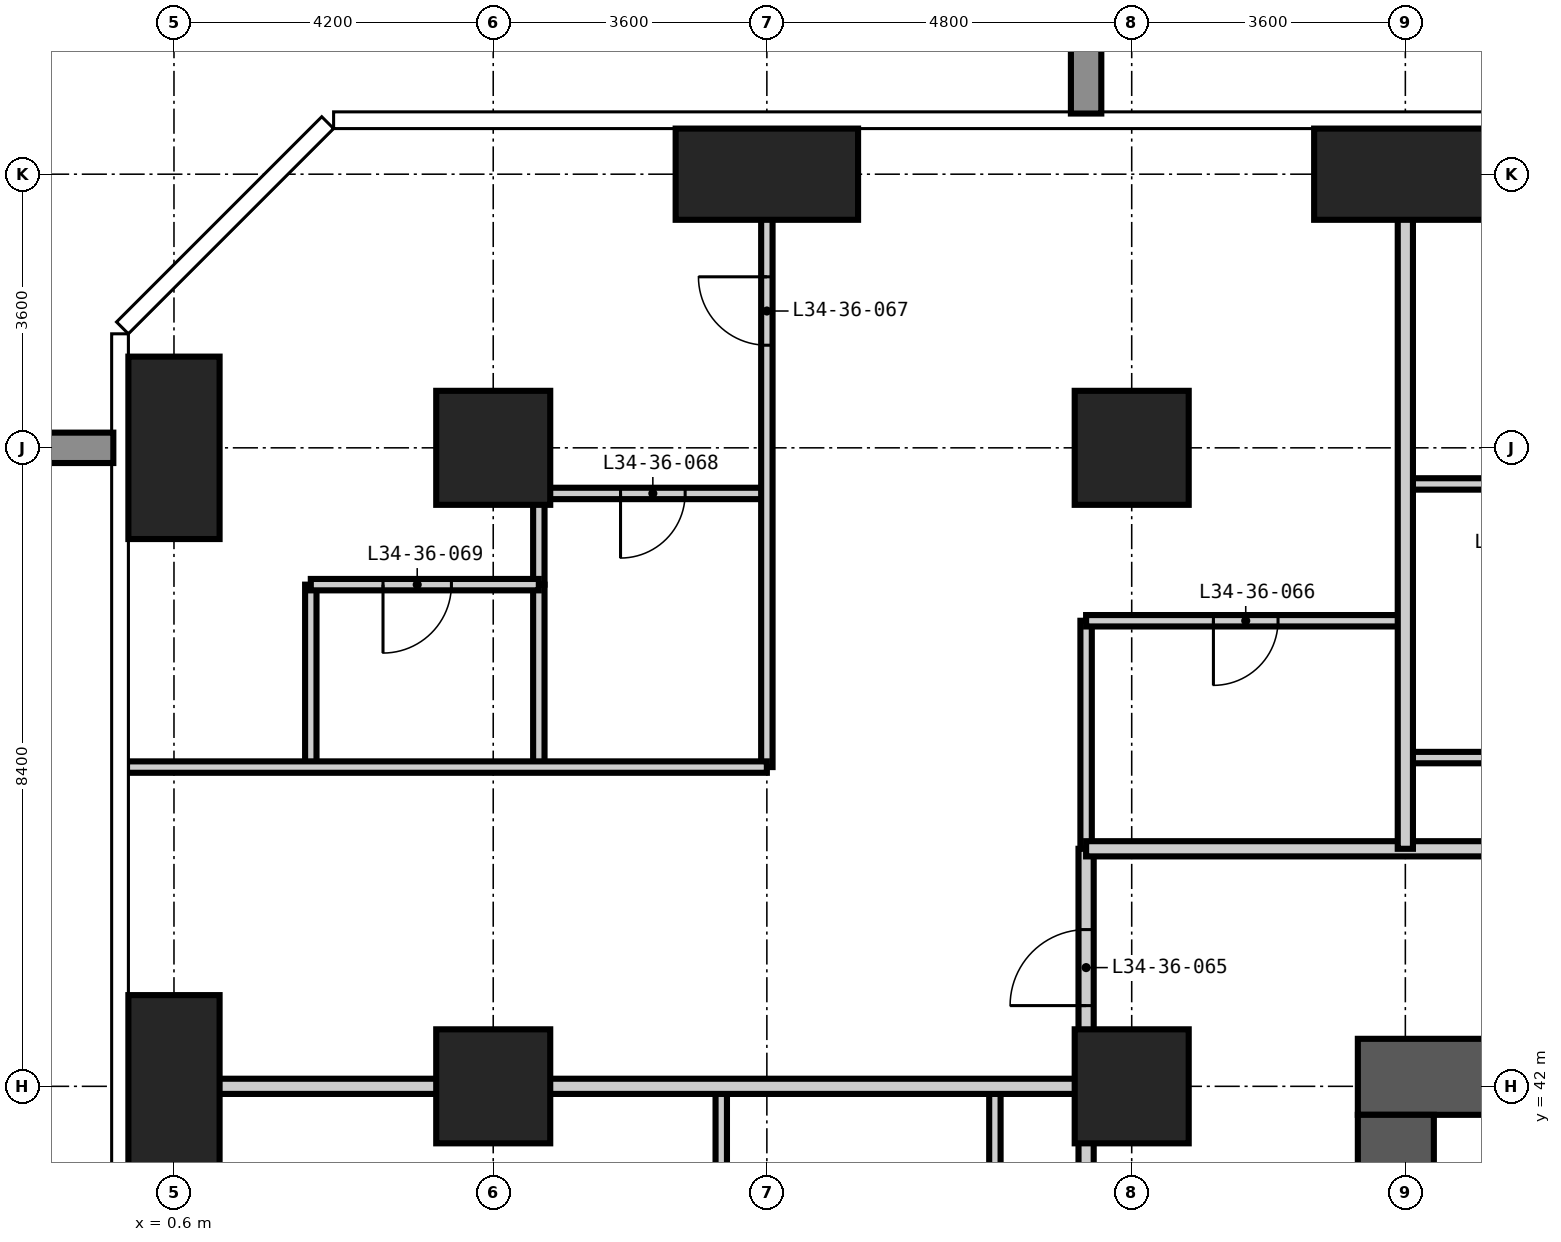
"""IFC4 building model, lengths in metres.
Left out: names, types, materials, properties, quantities, classifications, styles, units other than length and angle.
Written with IfcOpenShell. Run it as: python <this file> out.ifc"""

import sys

from ifc_helpers import new_model, si_unit, direction, frame, frame_2d, origin, origin_2d, place, context, subcontext, project, spatial, rectangle, extrude, element, fill, save


model = new_model("IFC4")
c1 = context("Model", 3, precision=1e-05, world=origin(), true_north=direction((0.0, 1.0)))
c2 = subcontext(c1, "Body", "Model", "MODEL_VIEW")
j1 = project(units=[si_unit("LENGTHUNIT", "METRE"), si_unit("PLANEANGLEUNIT", "RADIAN")], contexts=[c1])
p1 = place(None, origin())
s1 = spatial("IfcSite", under=j1, at=p1, CompositionType="ELEMENT")
p2 = place(p1, origin())
s2 = spatial("IfcBuilding", under=s1, at=p2, CompositionType="ELEMENT")
p3 = place(p2, frame((0.0, 0.0, 133.2)))
s3 = spatial("IfcBuildingStorey", under=s2, at=p3, CompositionType="ELEMENT", Elevation=133.2)
for number, where, z_axis, x_axis in (
    (1, (0.6, 42.0, -0.35), (0.0, 0.0, 1.0), (1.0, 0.0, 0.0)),
    (2, (0.6, 50.4, -0.35), (0.0, 0.0, 1.0), (1.0, 0.0, 0.0)),
):
    element("IfcColumn", number, at=place(p3, frame(where, z_axis=z_axis, x_axis=x_axis)), inside=s3, PredefinedType="COLUMN", context=c2, shape_type="SweptSolid", body=[
        extrude(rectangle(XDim=1.2, YDim=2.4, at=origin_2d()), origin(), (0.0, 0.0, 1.0), 3.6),
    ])
for number, where, z_axis, x_axis in (
    (3, (4.8, 42.0, -0.35), (0.0, 0.0, 1.0), (1.0, 0.0, 0.0)),
    (4, (4.8, 50.4, -0.35), (0.0, 0.0, 1.0), (1.0, 0.0, 0.0)),
):
    element("IfcColumn", number, at=place(p3, frame(where, z_axis=z_axis, x_axis=x_axis)), inside=s3, PredefinedType="COLUMN", context=c2, shape_type="SweptSolid", body=[
        extrude(rectangle(XDim=1.5, YDim=1.5, at=origin_2d()), origin(), (0.0, 0.0, 1.0), 3.6),
    ])
p4 = place(p3, frame((8.4, 54.0, -0.35), z_axis=(0.0, 0.0, 1.0), x_axis=(1.0, 0.0, 0.0)))
e5 = element("IfcColumn", 5, at=p4, inside=s3, PredefinedType="COLUMN", context=c2, shape_type="SweptSolid", body=[
    extrude(rectangle(XDim=2.4, YDim=1.2, at=origin_2d()), origin(), (0.0, 0.0, 1.0), 3.6),
])
for number, where, z_axis, x_axis in (
    (6, (13.2, 42.0, -0.35), (0.0, 0.0, 1.0), (1.0, 0.0, 0.0)),
    (7, (13.2, 50.4, -0.35), (0.0, 0.0, 1.0), (1.0, 0.0, 0.0)),
):
    element("IfcColumn", number, at=place(p3, frame(where, z_axis=z_axis, x_axis=x_axis)), inside=s3, PredefinedType="COLUMN", context=c2, shape_type="SweptSolid", body=[
        extrude(rectangle(XDim=1.5, YDim=1.5, at=origin_2d()), origin(), (0.0, 0.0, 1.0), 3.6),
    ])
p5 = place(p3, frame((16.8, 54.0, -0.35), z_axis=(0.0, 0.0, 1.0), x_axis=(1.0, 0.0, 0.0)))
e8 = element("IfcColumn", 8, at=p5, inside=s3, PredefinedType="COLUMN", context=c2, shape_type="SweptSolid", body=[
    extrude(rectangle(XDim=2.4, YDim=1.2, at=origin_2d()), origin(), (0.0, 0.0, 1.0), 3.6),
])
p6 = place(p3, frame((42.625, 42.125, -0.35), z_axis=(0.0, 0.0, 1.0), x_axis=(-1.0, 0.0, 0.0)))
e9 = element("IfcWall", 9, at=p6, inside=s3, PredefinedType="SHEAR", context=c2, shape_type="SweptSolid", body=[
    extrude(rectangle(XDim=26.45, YDim=1.0, at=frame_2d((13.225, 0.0))), origin(), (0.0, 0.0, 1.0), 3.6),
])
p7 = place(p6, frame((21.125, 0.0, 0.35)))
e10 = element("IfcOpeningElement", 10, at=p7, cuts=e9, PredefinedType="OPENING", context=c2, shape_type="SweptSolid", body=[
    extrude(rectangle(XDim=1.0, YDim=2.1, at=frame_2d((0.5, 1.05))), frame((0.0, 0.51, 0.0), z_axis=(0.0, -1.0, 0.0), x_axis=(1.0, 0.0, 0.0)), (0.0, 0.0, 1.0), 1.02),
])
p8 = place(p6, frame((10.525, 0.0, 0.35)))
e11 = element("IfcOpeningElement", 11, at=p8, cuts=e9, PredefinedType="OPENING", context=c2, shape_type="SweptSolid", body=[
    extrude(rectangle(XDim=1.2, YDim=2.2, at=frame_2d((0.6, 1.1))), frame((0.0, 0.51, 0.0), z_axis=(0.0, -1.0, 0.0), x_axis=(1.0, 0.0, 0.0)), (0.0, 0.0, 1.0), 1.02),
])
p9 = place(p3, frame((16.675, 41.625, -0.35), z_axis=(0.0, 0.0, 1.0), x_axis=(0.0, -1.0, 0.0)))
e12 = element("IfcWall", 12, at=p9, inside=s3, PredefinedType="SHEAR", context=c2, shape_type="SweptSolid", body=[
    extrude(rectangle(XDim=24.45, YDim=1.0, at=frame_2d((12.225, 0.0))), origin(), (0.0, 0.0, 1.0), 3.6),
])
p10 = place(p9, frame((11.325, 0.0, 0.35)))
e13 = element("IfcOpeningElement", 13, at=p10, cuts=e12, PredefinedType="OPENING", context=c2, shape_type="SweptSolid", body=[
    extrude(rectangle(XDim=1.8, YDim=2.2, at=frame_2d((0.9, 1.1))), frame((0.0, 0.51, 0.0), z_axis=(0.0, -1.0, 0.0), x_axis=(1.0, 0.0, 0.0)), (0.0, 0.0, 1.0), 1.02),
])
p11 = place(p9, frame((20.125, 0.0, 0.35)))
e14 = element("IfcOpeningElement", 14, at=p11, cuts=e12, PredefinedType="OPENING", context=c2, shape_type="SweptSolid", body=[
    extrude(rectangle(XDim=1.0, YDim=2.1, at=frame_2d((0.5, 1.05))), frame((0.0, 0.51, 0.0), z_axis=(0.0, -1.0, 0.0), x_axis=(1.0, 0.0, 0.0)), (0.0, 0.0, 1.0), 1.02),
])
p12 = place(p9, frame((5.425, 0.0, 0.35)))
e15 = element("IfcOpeningElement", 15, at=p12, cuts=e12, PredefinedType="OPENING", context=c2, shape_type="SweptSolid", body=[
    extrude(rectangle(XDim=1.0, YDim=2.1, at=frame_2d((0.5, 1.05))), frame((0.0, 0.51, 0.0), z_axis=(0.0, -1.0, 0.0), x_axis=(1.0, 0.0, 0.0)), (0.0, 0.0, 1.0), 1.02),
])
p13 = place(p3, frame((5.4, 48.6, 0.0), z_axis=(0.0, 0.0, 1.0), x_axis=(0.0, 1.0, 0.0)))
e16 = element("IfcWall", 16, at=p13, inside=s3, PredefinedType="PARTITIONING", context=c2, shape_type="SweptSolid", body=[
    extrude(rectangle(XDim=1.2, YDim=0.15, at=frame_2d((0.6, 0.0))), origin(), (0.0, 0.0, 1.0), 3.25),
])
for number, where, z_axis, x_axis in (
    (17, (7.8, 39.3, 0.0), (0.0, 0.0, 1.0), (0.0, 1.0, 0.0)),
    (18, (11.4, 39.3, 0.0), (0.0, 0.0, 1.0), (0.0, 1.0, 0.0)),
):
    element("IfcWall", number, at=place(p3, frame(where, z_axis=z_axis, x_axis=x_axis)), inside=s3, PredefinedType="PARTITIONING", context=c2, shape_type="SweptSolid", body=[
        extrude(rectangle(XDim=2.7, YDim=0.15, at=frame_2d((1.35, 0.0))), origin(), (0.0, 0.0, 1.0), 3.25),
    ])
p14 = place(p3, frame((12.6, 45.125, 0.0), z_axis=(0.0, 0.0, 1.0), x_axis=(0.0, 1.0, 0.0)))
e19 = element("IfcWall", 19, at=p14, inside=s3, PredefinedType="PARTITIONING", context=c2, shape_type="SweptSolid", body=[
    extrude(rectangle(XDim=3.0, YDim=0.15, at=frame_2d((1.5, 0.0))), origin(), (0.0, 0.0, 1.0), 3.25),
])
p15 = place(p3, frame((16.8, 46.325, 0.0), z_axis=(0.0, 0.0, 1.0), x_axis=(1.0, 0.0, 0.0)))
e20 = element("IfcWall", 20, at=p15, inside=s3, PredefinedType="PARTITIONING", context=c2, shape_type="SweptSolid", body=[
    extrude(rectangle(XDim=2.7, YDim=0.15, at=frame_2d((1.35, 0.0))), origin(), (0.0, 0.0, 1.0), 3.25),
])
p16 = place(p3, frame((12.6, 48.125, 0.0), z_axis=(0.0, 0.0, 1.0), x_axis=(1.0, 0.0, 0.0)))
e21 = element("IfcWall", 21, at=p16, inside=s3, PredefinedType="PARTITIONING", context=c2, shape_type="SweptSolid", body=[
    extrude(rectangle(XDim=4.2, YDim=0.15, at=frame_2d((2.1, 0.0))), origin(), (0.0, 0.0, 1.0), 3.25),
])
p17 = place(p16, frame((1.675, 0.0, 0.0)))
e22 = element("IfcOpeningElement", 22, at=p17, cuts=e21, PredefinedType="OPENING", context=c2, shape_type="SweptSolid", body=[
    extrude(rectangle(XDim=0.85, YDim=2.1, at=frame_2d((0.425, 1.05))), frame((0.0, 0.085, 0.0), z_axis=(0.0, -1.0, 0.0), x_axis=(1.0, 0.0, 0.0)), (0.0, 0.0, 1.0), 0.17),
])
p18 = place(p3, frame((5.4, 49.8, 0.0), z_axis=(0.0, 0.0, 1.0), x_axis=(1.0, 0.0, 0.0)))
e23 = element("IfcWall", 23, at=p18, inside=s3, PredefinedType="PARTITIONING", context=c2, shape_type="SweptSolid", body=[
    extrude(rectangle(XDim=3.0, YDim=0.15, at=frame_2d((1.5, 0.0))), origin(), (0.0, 0.0, 1.0), 3.25),
])
p19 = place(p18, frame((1.075, 0.0, 0.0)))
e24 = element("IfcOpeningElement", 24, at=p19, cuts=e23, PredefinedType="OPENING", context=c2, shape_type="SweptSolid", body=[
    extrude(rectangle(XDim=0.85, YDim=2.1, at=frame_2d((0.425, 1.05))), frame((0.0, 0.085, 0.0), z_axis=(0.0, -1.0, 0.0), x_axis=(1.0, 0.0, 0.0)), (0.0, 0.0, 1.0), 0.17),
])
p20 = place(p3, frame((16.8, 49.925, 0.0), z_axis=(0.0, 0.0, 1.0), x_axis=(1.0, 0.0, 0.0)))
e25 = element("IfcWall", 25, at=p20, inside=s3, PredefinedType="PARTITIONING", context=c2, shape_type="SweptSolid", body=[
    extrude(rectangle(XDim=2.7, YDim=0.15, at=frame_2d((1.35, 0.0))), origin(), (0.0, 0.0, 1.0), 3.25),
])
p21 = place(p3, frame((12.6, 14.275, 0.0), z_axis=(0.0, 0.0, 1.0), x_axis=(0.0, 1.0, 0.0)))
e26 = element("IfcWall", 26, at=p21, inside=s3, PredefinedType="PARTITIONING", context=c2, shape_type="SweptSolid", body=[
    extrude(rectangle(XDim=30.85, YDim=0.2, at=frame_2d((15.425, 0.0))), origin(), (0.0, 0.0, 1.0), 3.25),
])
p22 = place(p21, frame((6.225, 0.0, 0.0)))
e27 = element("IfcOpeningElement", 27, at=p22, cuts=e26, PredefinedType="OPENING", context=c2, shape_type="SweptSolid", body=[
    extrude(rectangle(XDim=1.0, YDim=2.2, at=frame_2d((0.5, 1.1))), frame((0.0, 0.11, 0.0), z_axis=(0.0, -1.0, 0.0), x_axis=(1.0, 0.0, 0.0)), (0.0, 0.0, 1.0), 0.22),
])
p23 = place(p21, frame((12.525, 0.0, 0.0)))
e28 = element("IfcOpeningElement", 28, at=p23, cuts=e26, PredefinedType="OPENING", context=c2, shape_type="SweptSolid", body=[
    extrude(rectangle(XDim=1.0, YDim=2.2, at=frame_2d((0.5, 1.1))), frame((0.0, 0.11, 0.0), z_axis=(0.0, -1.0, 0.0), x_axis=(1.0, 0.0, 0.0)), (0.0, 0.0, 1.0), 0.22),
])
p24 = place(p21, frame((20.925, 0.0, 0.0)))
e29 = element("IfcOpeningElement", 29, at=p24, cuts=e26, PredefinedType="OPENING", context=c2, shape_type="SweptSolid", body=[
    extrude(rectangle(XDim=1.0, YDim=2.2, at=frame_2d((0.5, 1.1))), frame((0.0, 0.11, 0.0), z_axis=(0.0, -1.0, 0.0), x_axis=(1.0, 0.0, 0.0)), (0.0, 0.0, 1.0), 0.22),
])
p25 = place(p21, frame((0.663, 0.0, 0.0)))
e30 = element("IfcOpeningElement", 30, at=p25, cuts=e26, PredefinedType="OPENING", context=c2, shape_type="SweptSolid", body=[
    extrude(rectangle(XDim=1.0, YDim=2.2, at=frame_2d((0.5, 1.1))), frame((0.0, 0.11, 0.0), z_axis=(0.0, -1.0, 0.0), x_axis=(1.0, 0.0, 0.0)), (0.0, 0.0, 1.0), 0.22),
])
p26 = place(p21, frame((28.787, 0.0, 0.0)))
e31 = element("IfcOpeningElement", 31, at=p26, cuts=e26, PredefinedType="OPENING", context=c2, shape_type="SweptSolid", body=[
    extrude(rectangle(XDim=1.0, YDim=2.2, at=frame_2d((0.5, 1.1))), frame((0.0, 0.11, 0.0), z_axis=(0.0, -1.0, 0.0), x_axis=(1.0, 0.0, 0.0)), (0.0, 0.0, 1.0), 0.22),
])
p27 = place(p3, frame((12.6, 45.125, 0.0), z_axis=(0.0, 0.0, 1.0), x_axis=(1.0, 0.0, 0.0)))
e32 = element("IfcWall", 32, at=p27, inside=s3, PredefinedType="PARTITIONING", context=c2, shape_type="SweptSolid", body=[
    extrude(rectangle(XDim=33.125, YDim=0.2, at=frame_2d((16.562, 0.0))), origin(), (0.0, 0.0, 1.0), 3.25),
])
p28 = place(p27, frame((5.8, 0.0, 0.0)))
e33 = element("IfcOpeningElement", 33, at=p28, cuts=e32, PredefinedType="OPENING", context=c2, shape_type="SweptSolid", body=[
    extrude(rectangle(XDim=1.0, YDim=2.2, at=frame_2d((0.5, 1.1))), frame((0.0, 0.11, 0.0), z_axis=(0.0, -1.0, 0.0), x_axis=(1.0, 0.0, 0.0)), (0.0, 0.0, 1.0), 0.22),
])
p29 = place(p27, frame((12.1, 0.0, 0.0)))
e34 = element("IfcOpeningElement", 34, at=p29, cuts=e32, PredefinedType="OPENING", context=c2, shape_type="SweptSolid", body=[
    extrude(rectangle(XDim=1.0, YDim=2.2, at=frame_2d((0.5, 1.1))), frame((0.0, 0.11, 0.0), z_axis=(0.0, -1.0, 0.0), x_axis=(1.0, 0.0, 0.0)), (0.0, 0.0, 1.0), 0.22),
])
p30 = place(p27, frame((20.5, 0.0, 0.0)))
e35 = element("IfcOpeningElement", 35, at=p30, cuts=e32, PredefinedType="OPENING", context=c2, shape_type="SweptSolid", body=[
    extrude(rectangle(XDim=1.0, YDim=2.2, at=frame_2d((0.5, 1.1))), frame((0.0, 0.11, 0.0), z_axis=(0.0, -1.0, 0.0), x_axis=(1.0, 0.0, 0.0)), (0.0, 0.0, 1.0), 0.22),
])
p31 = place(p27, frame((26.8, 0.0, 0.0)))
e36 = element("IfcOpeningElement", 36, at=p31, cuts=e32, PredefinedType="OPENING", context=c2, shape_type="SweptSolid", body=[
    extrude(rectangle(XDim=1.0, YDim=2.2, at=frame_2d((0.5, 1.1))), frame((0.0, 0.11, 0.0), z_axis=(0.0, -1.0, 0.0), x_axis=(1.0, 0.0, 0.0)), (0.0, 0.0, 1.0), 0.22),
])
p32 = place(p3, frame((16.8, 45.125, 0.0), z_axis=(0.0, 0.0, 1.0), x_axis=(0.0, 1.0, 0.0)))
e37 = element("IfcWall", 37, at=p32, inside=s3, PredefinedType="PARTITIONING", context=c2, shape_type="SweptSolid", body=[
    extrude(rectangle(XDim=9.493, YDim=0.2, at=frame_2d((4.747, 0.0))), origin(), (0.0, 0.0, 1.0), 3.25),
])
p33 = place(p3, frame((-0.018, 42.0, 0.0), z_axis=(0.0, 0.0, 1.0), x_axis=(1.0, 0.0, 0.0)))
e38 = element("IfcWall", 38, at=p33, inside=s3, PredefinedType="PARTITIONING", context=c2, shape_type="SweptSolid", body=[
    extrude(rectangle(XDim=12.618, YDim=0.2, at=frame_2d((6.309, 0.0))), origin(), (0.0, 0.0, 1.0), 3.25),
])
for number, where, z_axis, x_axis in (
    (39, (2.4, 46.2, 0.0), (0.0, 0.0, 1.0), (0.0, 1.0, 0.0)),
    (40, (5.4, 46.2, 0.0), (0.0, 0.0, 1.0), (0.0, 1.0, 0.0)),
):
    element("IfcWall", number, at=place(p3, frame(where, z_axis=z_axis, x_axis=x_axis)), inside=s3, PredefinedType="PARTITIONING", context=c2, shape_type="SweptSolid", body=[
        extrude(rectangle(XDim=2.4, YDim=0.15, at=frame_2d((1.2, 0.0))), origin(), (0.0, 0.0, 1.0), 3.25),
    ])
p34 = place(p3, frame((8.4, 46.2, 0.0), z_axis=(0.0, 0.0, 1.0), x_axis=(0.0, 1.0, 0.0)))
e41 = element("IfcWall", 41, at=p34, inside=s3, PredefinedType="PARTITIONING", context=c2, shape_type="SweptSolid", body=[
    extrude(rectangle(XDim=8.418, YDim=0.15, at=frame_2d((4.209, 0.0))), origin(), (0.0, 0.0, 1.0), 3.25),
])
p35 = place(p34, frame((5.55, 0.0, 0.0)))
e42 = element("IfcOpeningElement", 42, at=p35, cuts=e41, PredefinedType="OPENING", context=c2, shape_type="SweptSolid", body=[
    extrude(rectangle(XDim=0.9, YDim=2.1, at=frame_2d((0.45, 1.05))), frame((0.0, 0.085, 0.0), z_axis=(0.0, -1.0, 0.0), x_axis=(1.0, 0.0, 0.0)), (0.0, 0.0, 1.0), 0.17),
])
p36 = place(p3, frame((-0.018, 46.2, 0.0), z_axis=(0.0, 0.0, 1.0), x_axis=(1.0, 0.0, 0.0)))
e43 = element("IfcWall", 43, at=p36, inside=s3, PredefinedType="PARTITIONING", context=c2, shape_type="SweptSolid", body=[
    extrude(rectangle(XDim=8.418, YDim=0.15, at=frame_2d((4.209, 0.0))), origin(), (0.0, 0.0, 1.0), 3.25),
])
p37 = place(p3, frame((2.4, 48.6, 0.0), z_axis=(0.0, 0.0, 1.0), x_axis=(1.0, 0.0, 0.0)))
e44 = element("IfcWall", 44, at=p37, inside=s3, PredefinedType="PARTITIONING", context=c2, shape_type="SweptSolid", body=[
    extrude(rectangle(XDim=3.0, YDim=0.15, at=frame_2d((1.5, 0.0))), origin(), (0.0, 0.0, 1.0), 3.25),
])
p38 = place(p37, frame((0.95, 0.0, 0.0)))
e45 = element("IfcOpeningElement", 45, at=p38, cuts=e44, PredefinedType="OPENING", context=c2, shape_type="SweptSolid", body=[
    extrude(rectangle(XDim=0.9, YDim=2.1, at=frame_2d((0.45, 1.05))), frame((0.0, 0.085, 0.0), z_axis=(0.0, -1.0, 0.0), x_axis=(1.0, 0.0, 0.0)), (0.0, 0.0, 1.0), 0.17),
])
p39 = place(p26, origin())
e46 = element("IfcDoor", 46, at=p39, inside=s3, OperationType="SINGLE_SWING_LEFT", PredefinedType="DOOR", context=c2, shape_type="SweptSolid", body=[
    extrude(rectangle(XDim=1.0, YDim=2.2, at=frame_2d((0.5, 1.1))), frame((0.0, 0.025, 0.0), z_axis=(0.0, -1.0, 0.0), x_axis=(1.0, 0.0, 0.0)), (0.0, 0.0, 1.0), 0.05),
])
fill(e31, e46)
p40 = place(p17, frame((0.85, 0.0, 0.0), z_axis=(0.0, 0.0, 1.0), x_axis=(-1.0, 0.0, 0.0)))
e47 = element("IfcDoor", 47, at=p40, inside=s3, OperationType="SINGLE_SWING_RIGHT", PredefinedType="DOOR", context=c2, shape_type="SweptSolid", body=[
    extrude(rectangle(XDim=0.85, YDim=2.1, at=frame_2d((0.425, 1.05))), frame((0.0, 0.025, 0.0), z_axis=(0.0, -1.0, 0.0), x_axis=(1.0, 0.0, 0.0)), (0.0, 0.0, 1.0), 0.05),
])
fill(e22, e47)
p41 = place(p35, origin())
e48 = element("IfcDoor", 48, at=p41, inside=s3, OperationType="SINGLE_SWING_RIGHT", PredefinedType="DOOR", context=c2, shape_type="SweptSolid", body=[
    extrude(rectangle(XDim=0.9, YDim=2.1, at=frame_2d((0.45, 1.05))), frame((0.0, 0.025, 0.0), z_axis=(0.0, -1.0, 0.0), x_axis=(1.0, 0.0, 0.0)), (0.0, 0.0, 1.0), 0.05),
])
fill(e42, e48)
p42 = place(p19, frame((0.85, 0.0, 0.0), z_axis=(0.0, 0.0, 1.0), x_axis=(-1.0, 0.0, 0.0)))
e49 = element("IfcDoor", 49, at=p42, inside=s3, OperationType="SINGLE_SWING_RIGHT", PredefinedType="DOOR", context=c2, shape_type="SweptSolid", body=[
    extrude(rectangle(XDim=0.85, YDim=2.1, at=frame_2d((0.425, 1.05))), frame((0.0, 0.025, 0.0), z_axis=(0.0, -1.0, 0.0), x_axis=(1.0, 0.0, 0.0)), (0.0, 0.0, 1.0), 0.05),
])
fill(e24, e49)
p43 = place(p38, frame((0.9, 0.0, 0.0), z_axis=(0.0, 0.0, 1.0), x_axis=(-1.0, 0.0, 0.0)))
e50 = element("IfcDoor", 50, at=p43, inside=s3, OperationType="SINGLE_SWING_RIGHT", PredefinedType="DOOR", context=c2, shape_type="SweptSolid", body=[
    extrude(rectangle(XDim=0.9, YDim=2.1, at=frame_2d((0.45, 1.05))), frame((0.0, 0.025, 0.0), z_axis=(0.0, -1.0, 0.0), x_axis=(1.0, 0.0, 0.0)), (0.0, 0.0, 1.0), 0.05),
])
fill(e45, e50)
save(model, sys.argv[1])
